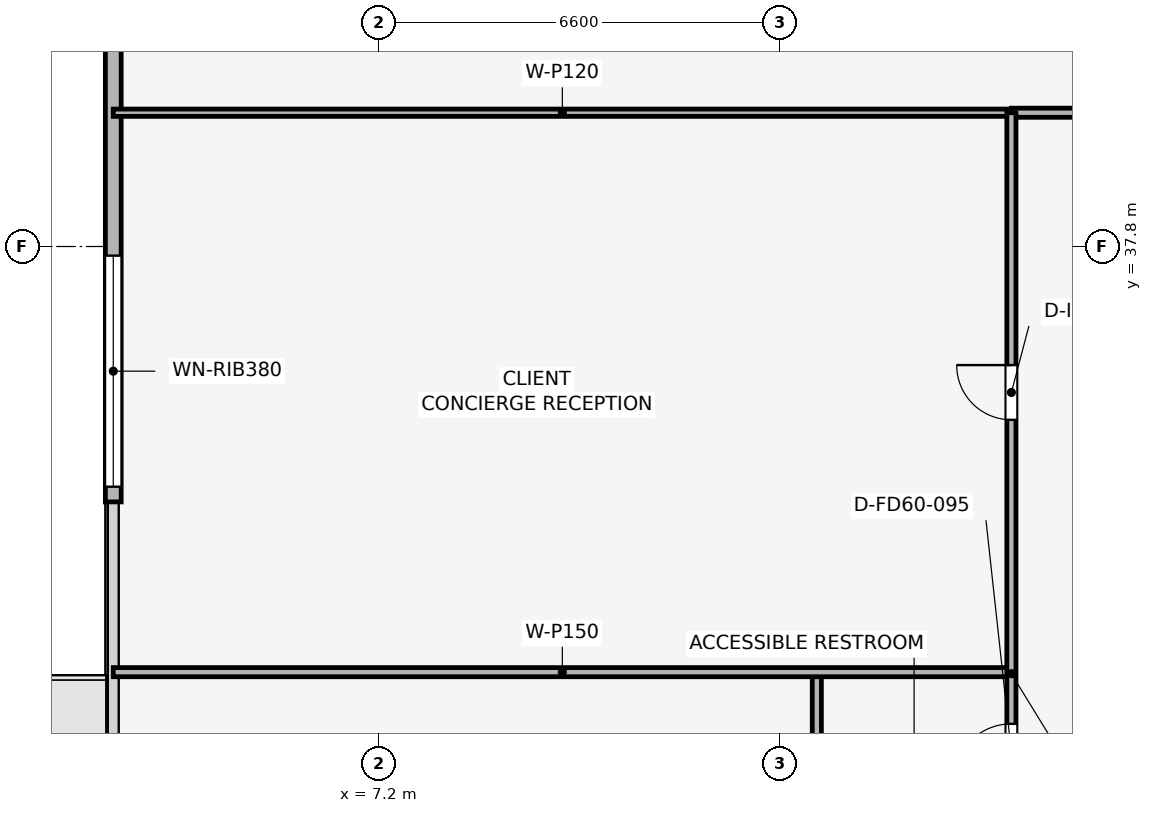
"""IFC4 building model, lengths in metres.
Left out: names, types, materials, properties, quantities, classifications, styles, units other than length and angle.
Written with IfcOpenShell. Run it as: python <this file> out.ifc"""

import sys

from ifc_helpers import new_model, si_unit, direction, frame, frame_2d, origin, place, context, subcontext, project, spatial, rectangle, extrude, element, fill, save


model = new_model("IFC4")
c1 = context("Model", 3, precision=1e-05, world=origin(), true_north=direction((0.0, 1.0)))
c2 = subcontext(c1, "Body", "Model", "MODEL_VIEW")
j1 = project(units=[si_unit("LENGTHUNIT", "METRE"), si_unit("PLANEANGLEUNIT", "RADIAN")], contexts=[c1])
p1 = place(None, origin())
s1 = spatial("IfcSite", under=j1, at=p1, CompositionType="ELEMENT")
p2 = place(p1, origin())
s2 = spatial("IfcBuilding", under=s1, at=p2, CompositionType="ELEMENT")
p3 = place(p2, frame((0.0, 0.0, 121.2)))
s3 = spatial("IfcBuildingStorey", under=s2, at=p3, CompositionType="ELEMENT", Elevation=121.2)
p4 = place(p3, frame((2.83, 33.6, 0.0), z_axis=(0.0, 0.0, 1.0), x_axis=(0.0, 1.0, 0.0)))
e1 = element("IfcWall", 1, at=p4, inside=s3, PredefinedType="SOLIDWALL", context=c2, shape_type="SweptSolid", body=[
    extrude(rectangle(XDim=14.1, YDim=0.26, at=frame_2d((7.05, 0.0))), origin(), (0.0, 0.0, 1.0), 3.65),
])
p5 = place(p4, frame((0.25, 0.0, 0.9)))
e2 = element("IfcOpeningElement", 2, at=p5, cuts=e1, PredefinedType="OPENING", context=c2, shape_type="SweptSolid", body=[
    extrude(rectangle(XDim=3.8, YDim=1.9, at=frame_2d((1.9, 0.95))), frame((0.0, 0.14, 0.0), z_axis=(0.0, -1.0, 0.0), x_axis=(1.0, 0.0, 0.0)), (0.0, 0.0, 1.0), 0.28),
])
p6 = place(p3, frame((2.83, 40.0, 0.0), z_axis=(0.0, 0.0, 1.0), x_axis=(1.0, 0.0, 0.0)))
e3 = element("IfcWall", 3, at=p6, inside=s3, PredefinedType="PARTITIONING", context=c2, shape_type="SweptSolid", body=[
    extrude(rectangle(XDim=14.77, YDim=0.12, at=frame_2d((7.385, 0.0))), origin(), (0.0, 0.0, 1.0), 3.035),
])
p7 = place(p3, frame((14.4, 22.4, 0.0), z_axis=(0.0, 0.0, 1.0), x_axis=(0.0, 1.0, 0.0)))
e4 = element("IfcWall", 4, at=p7, inside=s3, PredefinedType="PARTITIONING", context=c2, shape_type="SweptSolid", body=[
    extrude(rectangle(XDim=8.4, YDim=0.15, at=frame_2d((4.2, 0.0))), origin(), (0.0, 0.0, 1.0), 3.185),
])
p8 = place(p3, frame((2.83, 30.8, 0.0), z_axis=(0.0, 0.0, 1.0), x_axis=(1.0, 0.0, 0.0)))
e5 = element("IfcWall", 5, at=p8, inside=s3, PredefinedType="PARTITIONING", context=c2, shape_type="SweptSolid", body=[
    extrude(rectangle(XDim=14.77, YDim=0.15, at=frame_2d((7.385, 0.0))), origin(), (0.0, 0.0, 1.0), 3.035),
])
p9 = place(p3, frame((17.6, 40.0, 0.0), z_axis=(0.0, 0.0, 1.0), x_axis=(1.0, 0.0, 0.0)))
e6 = element("IfcWall", 6, at=p9, inside=s3, PredefinedType="PARTITIONING", context=c2, shape_type="SweptSolid", body=[
    extrude(rectangle(XDim=22.4, YDim=0.15, at=frame_2d((11.2, 0.0))), origin(), (0.0, 0.0, 1.0), 3.185),
])
p10 = place(p9, frame((10.75, 0.0, 0.0)))
e7 = element("IfcOpeningElement", 7, at=p10, cuts=e6, PredefinedType="OPENING", context=c2, shape_type="SweptSolid", body=[
    extrude(rectangle(XDim=0.9, YDim=2.1, at=frame_2d((0.45, 1.05))), frame((0.0, 0.085, 0.0), z_axis=(0.0, -1.0, 0.0), x_axis=(1.0, 0.0, 0.0)), (0.0, 0.0, 1.0), 0.17),
])
p11 = place(p3, frame((17.6, 17.6, 0.0), z_axis=(0.0, 0.0, 1.0), x_axis=(0.0, 1.0, 0.0)))
e8 = element("IfcWall", 8, at=p11, inside=s3, PredefinedType="PARTITIONING", context=c2, shape_type="SweptSolid", body=[
    extrude(rectangle(XDim=22.4, YDim=0.15, at=frame_2d((11.2, 0.0))), origin(), (0.0, 0.0, 1.0), 3.185),
])
p12 = place(p11, frame((1.95, 0.0, 0.0)))
e9 = element("IfcOpeningElement", 9, at=p12, cuts=e8, PredefinedType="OPENING", context=c2, shape_type="SweptSolid", body=[
    extrude(rectangle(XDim=0.9, YDim=2.1, at=frame_2d((0.45, 1.05))), frame((0.0, 0.085, 0.0), z_axis=(0.0, -1.0, 0.0), x_axis=(1.0, 0.0, 0.0)), (0.0, 0.0, 1.0), 0.17),
])
p13 = place(p11, frame((5.75, 0.0, 0.0)))
e10 = element("IfcOpeningElement", 10, at=p13, cuts=e8, PredefinedType="OPENING", context=c2, shape_type="SweptSolid", body=[
    extrude(rectangle(XDim=0.9, YDim=2.1, at=frame_2d((0.45, 1.05))), frame((0.0, 0.085, 0.0), z_axis=(0.0, -1.0, 0.0), x_axis=(1.0, 0.0, 0.0)), (0.0, 0.0, 1.0), 0.17),
])
p14 = place(p11, frame((8.65, 0.0, 0.0)))
e11 = element("IfcOpeningElement", 11, at=p14, cuts=e8, PredefinedType="OPENING", context=c2, shape_type="SweptSolid", body=[
    extrude(rectangle(XDim=0.9, YDim=2.1, at=frame_2d((0.45, 1.05))), frame((0.0, 0.085, 0.0), z_axis=(0.0, -1.0, 0.0), x_axis=(1.0, 0.0, 0.0)), (0.0, 0.0, 1.0), 0.17),
])
p15 = place(p11, frame((11.4, 0.0, 0.0)))
e12 = element("IfcOpeningElement", 12, at=p15, cuts=e8, PredefinedType="OPENING", context=c2, shape_type="SweptSolid", body=[
    extrude(rectangle(XDim=0.95, YDim=2.1, at=frame_2d((0.475, 1.05))), frame((0.0, 0.085, 0.0), z_axis=(0.0, -1.0, 0.0), x_axis=(1.0, 0.0, 0.0)), (0.0, 0.0, 1.0), 0.17),
])
p16 = place(p11, frame((17.35, 0.0, 0.0)))
e13 = element("IfcOpeningElement", 13, at=p16, cuts=e8, PredefinedType="OPENING", context=c2, shape_type="SweptSolid", body=[
    extrude(rectangle(XDim=0.9, YDim=2.1, at=frame_2d((0.45, 1.05))), frame((0.0, 0.085, 0.0), z_axis=(0.0, -1.0, 0.0), x_axis=(1.0, 0.0, 0.0)), (0.0, 0.0, 1.0), 0.17),
])
p17 = place(p5, origin())
e14 = element("IfcWindow", 14, at=p17, inside=s3, PartitioningType="SINGLE_PANEL", PredefinedType="WINDOW", context=c2, shape_type="SweptSolid", body=[
    extrude(rectangle(XDim=3.8, YDim=1.9, at=frame_2d((1.9, 0.95))), frame((0.0, 0.03, 0.0), z_axis=(0.0, -1.0, 0.0), x_axis=(1.0, 0.0, 0.0)), (0.0, 0.0, 1.0), 0.06),
])
fill(e2, e14)
p18 = place(p15, origin())
e15 = element("IfcDoor", 15, at=p18, inside=s3, OperationType="SINGLE_SWING_LEFT", PredefinedType="DOOR", context=c2, shape_type="SweptSolid", body=[
    extrude(rectangle(XDim=0.95, YDim=2.1, at=frame_2d((0.475, 1.05))), frame((0.0, 0.025, 0.0), z_axis=(0.0, -1.0, 0.0), x_axis=(1.0, 0.0, 0.0)), (0.0, 0.0, 1.0), 0.05),
])
fill(e12, e15)
p19 = place(p16, origin())
e16 = element("IfcDoor", 16, at=p19, inside=s3, OperationType="SINGLE_SWING_RIGHT", PredefinedType="DOOR", context=c2, shape_type="SweptSolid", body=[
    extrude(rectangle(XDim=0.9, YDim=2.1, at=frame_2d((0.45, 1.05))), frame((0.0, 0.025, 0.0), z_axis=(0.0, -1.0, 0.0), x_axis=(1.0, 0.0, 0.0)), (0.0, 0.0, 1.0), 0.05),
])
fill(e13, e16)
save(model, sys.argv[1])
